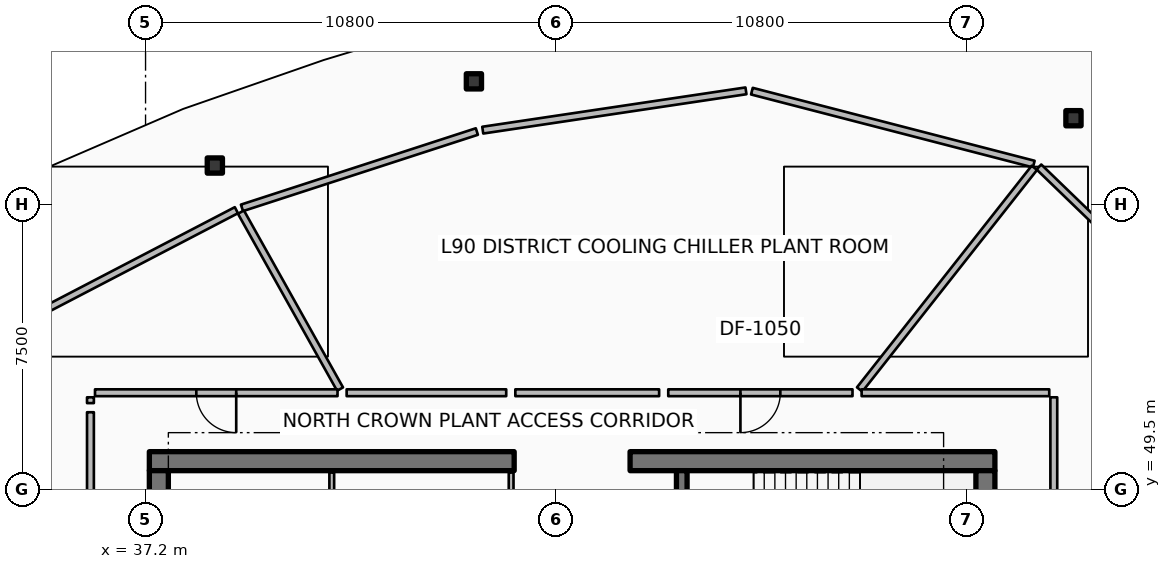
"""IFC4 building model, lengths in metres.
Left out: names, types, materials, properties, quantities, classifications, styles, units other than length and angle.
Written with IfcOpenShell. Run it as: python <this file> out.ifc"""

import sys

from ifc_helpers import new_model, si_unit, direction, frame, frame_2d, origin, origin_2d, place, context, subcontext, project, spatial, rectangle, hollow_rectangle, extrude, element, fill, save


model = new_model("IFC4")
c1 = context("Model", 3, precision=1e-05, world=origin(), true_north=direction((0.0, 1.0)))
c2 = subcontext(c1, "Body", "Model", "MODEL_VIEW")
j1 = project(units=[si_unit("LENGTHUNIT", "METRE"), si_unit("PLANEANGLEUNIT", "RADIAN")], contexts=[c1])
p1 = place(None, origin())
s1 = spatial("IfcSite", under=j1, at=p1, CompositionType="ELEMENT")
p2 = place(p1, origin())
s2 = spatial("IfcBuilding", under=s1, at=p2, CompositionType="ELEMENT")
p3 = place(p2, frame((0.0, 0.0, 359.6)))
s3 = spatial("IfcBuildingStorey", under=s2, at=p3, CompositionType="ELEMENT", Elevation=359.6)
p4 = place(p3, frame((37.3, 50.25, 0.0), z_axis=(0.0, 0.0, 1.0), x_axis=(1.0, 0.0, 0.0)))
e1 = element("IfcWall", 1, at=p4, inside=s3, PredefinedType="SHEAR", context=c2, shape_type="SweptSolid", body=[
    extrude(rectangle(XDim=9.6, YDim=0.5, at=frame_2d((4.8, 0.0))), origin(), (0.0, 0.0, 1.0), 3.6),
])
p5 = place(p3, frame((49.95, 50.25, 0.0), z_axis=(0.0, 0.0, 1.0), x_axis=(1.0, 0.0, 0.0)))
e2 = element("IfcWall", 2, at=p5, inside=s3, PredefinedType="SHEAR", context=c2, shape_type="SweptSolid", body=[
    extrude(rectangle(XDim=9.6, YDim=0.5, at=frame_2d((4.8, 0.0))), origin(), (0.0, 0.0, 1.0), 3.6),
])
for number, where, z_axis, x_axis in (
    (3, (37.55, 34.0, 0.0), (0.0, 0.0, 1.0), (0.0, 1.0, 0.0)),
    (4, (59.3, 34.0, 0.0), (0.0, 0.0, 1.0), (0.0, 1.0, 0.0)),
):
    element("IfcWall", number, at=place(p3, frame(where, z_axis=z_axis, x_axis=x_axis)), inside=s3, PredefinedType="SHEAR", context=c2, shape_type="SweptSolid", body=[
        extrude(rectangle(XDim=16.0, YDim=0.5, at=frame_2d((8.0, 0.0))), origin(), (0.0, 0.0, 1.0), 3.6),
    ])
p6 = place(p3, frame((51.31, 46.5, 0.0), z_axis=(0.0, 0.0, 1.0), x_axis=(0.0, 1.0, 0.0)))
e5 = element("IfcWall", 5, at=p6, inside=s3, PredefinedType="SHEAR", context=c2, shape_type="SweptSolid", body=[
    extrude(rectangle(XDim=3.5, YDim=0.28, at=frame_2d((1.75, 0.0))), origin(), (0.0, 0.0, 1.0), 3.6),
])
for number, where, z_axis, x_axis in (
    (6, (61.617, 59.274, 0.0), (0.0, 0.0, 1.0), (1.0, 0.0, 0.0)),
    (7, (45.841, 60.244, 0.0), (0.0, 0.0, 1.0), (1.0, 0.0, 0.0)),
    (8, (39.023, 58.029, 0.0), (0.0, 0.0, 1.0), (1.0, 0.0, 0.0)),
):
    element("IfcColumn", number, at=place(p3, frame(where, z_axis=z_axis, x_axis=x_axis)), inside=s3, PredefinedType="COLUMN", context=c2, shape_type="SweptSolid", body=[
        extrude(hollow_rectangle(XDim=0.4, YDim=0.4, WallThickness=0.02, InnerFilletRadius=0.02, OuterFilletRadius=0.04, at=origin_2d()), origin(), (0.0, 0.0, 1.0), 3.32),
    ])
for number, where, z_axis, x_axis in (
    (9, (46.82, 47.92, 0.0), (0.0, 0.0, 1.0), (0.0, 1.0, 0.0)),
    (10, (42.1, 47.92, 0.0), (0.0, 0.0, 1.0), (0.0, 1.0, 0.0)),
):
    element("IfcWall", number, at=place(p3, frame(where, z_axis=z_axis, x_axis=x_axis)), inside=s3, PredefinedType="PARTITIONING", context=c2, shape_type="SweptSolid", body=[
        extrude(rectangle(XDim=2.03, YDim=0.125, at=frame_2d((1.015, 0.0))), origin(), (0.0, 0.0, 1.0), 2.76),
    ])
p7 = place(p3, frame((66.467, 52.43, 0.0), z_axis=(0.0, 0.0, 1.0), x_axis=(-0.719364153135, 0.694633151516, 0.0)))
e11 = element("IfcWall", 11, at=p7, inside=s3, PredefinedType="PARTITIONING", context=c2, shape_type="SweptSolid", body=[
    extrude(rectangle(XDim=8.006, YDim=0.18, at=frame_2d((4.003, 0.0))), origin(), (0.0, 0.0, 1.0), 2.76),
])
p8 = place(p3, frame((60.573, 58.066, 0.0), z_axis=(0.0, 0.0, 1.0), x_axis=(-0.968117205342, 0.250497658115, 0.0)))
e12 = element("IfcWall", 12, at=p8, inside=s3, PredefinedType="PARTITIONING", context=c2, shape_type="SweptSolid", body=[
    extrude(rectangle(XDim=7.662, YDim=0.18, at=frame_2d((3.831, 0.0))), origin(), (0.0, 0.0, 1.0), 2.76),
])
p9 = place(p3, frame((52.999, 59.994, 0.0), z_axis=(0.0, 0.0, 1.0), x_axis=(-0.989034336252, -0.147685753256, 0.0)))
e13 = element("IfcWall", 13, at=p9, inside=s3, PredefinedType="PARTITIONING", context=c2, shape_type="SweptSolid", body=[
    extrude(rectangle(XDim=7.003, YDim=0.18, at=frame_2d((3.501, 0.0))), origin(), (0.0, 0.0, 1.0), 2.76),
])
p10 = place(p3, frame((45.918, 58.923, 0.0), z_axis=(0.0, 0.0, 1.0), x_axis=(-0.95105283999, -0.309028308649, 0.0)))
e14 = element("IfcWall", 14, at=p10, inside=s3, PredefinedType="PARTITIONING", context=c2, shape_type="SweptSolid", body=[
    extrude(rectangle(XDim=6.499, YDim=0.18, at=frame_2d((3.25, 0.0))), origin(), (0.0, 0.0, 1.0), 2.76),
])
p11 = place(p3, frame((39.59, 56.853, 0.0), z_axis=(0.0, 0.0, 1.0), x_axis=(-0.886949494865, -0.461866423935, 0.0)))
e15 = element("IfcWall", 15, at=p11, inside=s3, PredefinedType="PARTITIONING", context=c2, shape_type="SweptSolid", body=[
    extrude(rectangle(XDim=7.002, YDim=0.18, at=frame_2d((3.501, 0.0))), origin(), (0.0, 0.0, 1.0), 2.76),
])
p12 = place(p3, frame((55.803, 52.05, 0.0), z_axis=(0.0, 0.0, 1.0), x_axis=(-1.0, 0.0, 0.0)))
e16 = element("IfcWall", 16, at=p12, inside=s3, PredefinedType="PARTITIONING", context=c2, shape_type="SweptSolid", body=[
    extrude(rectangle(XDim=4.848, YDim=0.18, at=frame_2d((2.424, 0.0))), origin(), (0.0, 0.0, 1.0), 2.76),
])
p13 = place(p12, frame((1.899, 0.0, 0.0)))
e17 = element("IfcOpeningElement", 17, at=p13, cuts=e16, PredefinedType="OPENING", context=c2, shape_type="SweptSolid", body=[
    extrude(rectangle(XDim=1.05, YDim=2.1, at=frame_2d((0.525, 1.05))), frame((0.0, 0.1, 0.0), z_axis=(0.0, -1.0, 0.0), x_axis=(1.0, 0.0, 0.0)), (0.0, 0.0, 1.0), 0.2),
])
p14 = place(p3, frame((50.714, 52.05, 0.0), z_axis=(0.0, 0.0, 1.0), x_axis=(-1.0, 0.0, 0.0)))
e18 = element("IfcWall", 18, at=p14, inside=s3, PredefinedType="PARTITIONING", context=c2, shape_type="SweptSolid", body=[
    extrude(rectangle(XDim=3.784, YDim=0.18, at=frame_2d((1.892, 0.0))), origin(), (0.0, 0.0, 1.0), 2.76),
])
p15 = place(p3, frame((46.69, 52.05, 0.0), z_axis=(0.0, 0.0, 1.0), x_axis=(-1.0, 0.0, 0.0)))
e19 = element("IfcWall", 19, at=p15, inside=s3, PredefinedType="PARTITIONING", context=c2, shape_type="SweptSolid", body=[
    extrude(rectangle(XDim=4.199, YDim=0.18, at=frame_2d((2.099, 0.0))), origin(), (0.0, 0.0, 1.0), 2.76),
])
p16 = place(p3, frame((55.991, 52.136, 0.0), z_axis=(0.0, 0.0, 1.0), x_axis=(0.619089811342, 0.785320192974, 0.0)))
e20 = element("IfcWall", 20, at=p16, inside=s3, PredefinedType="PARTITIONING", context=c2, shape_type="SweptSolid", body=[
    extrude(rectangle(XDim=7.426, YDim=0.18, at=frame_2d((3.713, 0.0))), origin(), (0.0, 0.0, 1.0), 2.76),
])
p17 = place(p3, frame((42.318, 52.146, 0.0), z_axis=(0.0, 0.0, 1.0), x_axis=(-0.488622869326, 0.872495095443, 0.0)))
e21 = element("IfcWall", 21, at=p17, inside=s3, PredefinedType="PARTITIONING", context=c2, shape_type="SweptSolid", body=[
    extrude(rectangle(XDim=5.337, YDim=0.18, at=frame_2d((2.668, 0.0))), origin(), (0.0, 0.0, 1.0), 2.76),
])
p18 = place(p3, frame((42.252, 52.05, 0.0), z_axis=(0.0, 0.0, 1.0), x_axis=(-1.0, 0.0, 0.0)))
e22 = element("IfcWall", 22, at=p18, inside=s3, PredefinedType="PARTITIONING", context=c2, shape_type="SweptSolid", body=[
    extrude(rectangle(XDim=6.382, YDim=0.18, at=frame_2d((3.191, 0.0))), origin(), (0.0, 0.0, 1.0), 2.76),
])
p19 = place(p18, frame((2.666, 0.0, 0.0)))
e23 = element("IfcOpeningElement", 23, at=p19, cuts=e22, PredefinedType="OPENING", context=c2, shape_type="SweptSolid", body=[
    extrude(rectangle(XDim=1.05, YDim=2.1, at=frame_2d((0.525, 1.05))), frame((0.0, 0.1, 0.0), z_axis=(0.0, -1.0, 0.0), x_axis=(1.0, 0.0, 0.0)), (0.0, 0.0, 1.0), 0.2),
])
p20 = place(p3, frame((35.75, 51.93, 0.0), z_axis=(0.0, 0.0, 1.0), x_axis=(0.0, -1.0, 0.0)))
e24 = element("IfcWall", 24, at=p20, inside=s3, PredefinedType="PARTITIONING", context=c2, shape_type="SweptSolid", body=[
    extrude(rectangle(XDim=0.153, YDim=0.18, at=frame_2d((0.076, 0.0))), origin(), (0.0, 0.0, 1.0), 2.76),
])
p21 = place(p3, frame((35.75, 51.537, 0.0), z_axis=(0.0, 0.0, 1.0), x_axis=(0.0, -1.0, 0.0)))
e25 = element("IfcWall", 25, at=p21, inside=s3, PredefinedType="PARTITIONING", context=c2, shape_type="SweptSolid", body=[
    extrude(rectangle(XDim=5.962, YDim=0.18, at=frame_2d((2.981, 0.0))), origin(), (0.0, 0.0, 1.0), 2.76),
])
p22 = place(p3, frame((61.1, 49.456, 0.0), z_axis=(0.0, 0.0, 1.0), x_axis=(0.0, 1.0, 0.0)))
e26 = element("IfcWall", 26, at=p22, inside=s3, PredefinedType="PARTITIONING", context=c2, shape_type="SweptSolid", body=[
    extrude(rectangle(XDim=2.474, YDim=0.18, at=frame_2d((1.237, 0.0))), origin(), (0.0, 0.0, 1.0), 2.76),
])
p23 = place(p3, frame((60.98, 52.05, 0.0), z_axis=(0.0, 0.0, 1.0), x_axis=(-1.0, 0.0, 0.0)))
e27 = element("IfcWall", 27, at=p23, inside=s3, PredefinedType="PARTITIONING", context=c2, shape_type="SweptSolid", body=[
    extrude(rectangle(XDim=4.937, YDim=0.18, at=frame_2d((2.469, 0.0))), origin(), (0.0, 0.0, 1.0), 2.76),
])
p24 = place(p13, origin())
e28 = element("IfcDoor", 28, at=p24, inside=s3, OperationType="SINGLE_SWING_RIGHT", PredefinedType="DOOR", context=c2, shape_type="SweptSolid", body=[
    extrude(rectangle(XDim=1.05, YDim=2.1, at=frame_2d((0.525, 1.05))), frame((0.0, 0.025, 0.0), z_axis=(0.0, -1.0, 0.0), x_axis=(1.0, 0.0, 0.0)), (0.0, 0.0, 1.0), 0.05),
])
fill(e17, e28)
p25 = place(p19, origin())
e29 = element("IfcDoor", 29, at=p25, inside=s3, OperationType="SINGLE_SWING_LEFT", PredefinedType="DOOR", context=c2, shape_type="SweptSolid", body=[
    extrude(rectangle(XDim=1.05, YDim=2.1, at=frame_2d((0.525, 1.05))), frame((0.0, 0.025, 0.0), z_axis=(0.0, -1.0, 0.0), x_axis=(1.0, 0.0, 0.0)), (0.0, 0.0, 1.0), 0.05),
])
fill(e23, e29)
save(model, sys.argv[1])
